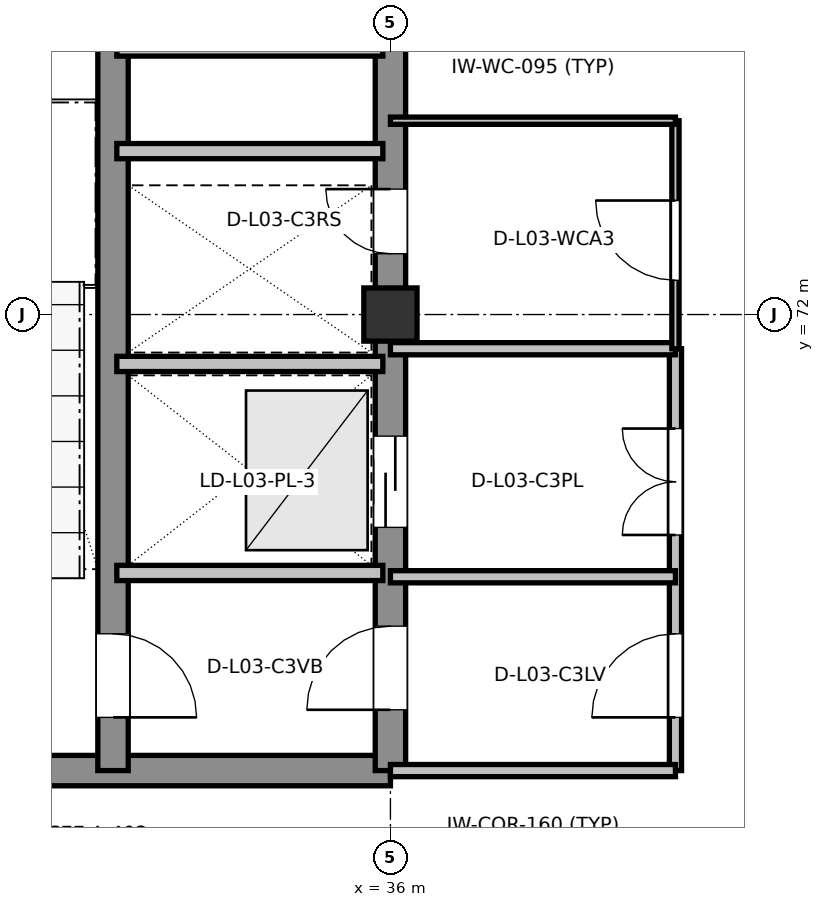
"""IFC4 building model, lengths in metres.
Left out: names, types, materials, properties, quantities, classifications, styles, units other than length and angle.
Written with IfcOpenShell. Run it as: python <this file> out.ifc"""

import sys

from ifc_helpers import new_model, si_unit, direction, frame, frame_2d, origin, origin_2d, place, context, subcontext, project, spatial, rectangle, extrude, element, fill, save


model = new_model("IFC4")
c1 = context("Model", 3, precision=1e-05, world=origin(), true_north=direction((0.0, 1.0)))
c2 = subcontext(c1, "Body", "Model", "MODEL_VIEW")
j1 = project(units=[si_unit("LENGTHUNIT", "METRE"), si_unit("PLANEANGLEUNIT", "RADIAN")], contexts=[c1])
p1 = place(None, origin())
s1 = spatial("IfcSite", under=j1, at=p1, CompositionType="ELEMENT")
p2 = place(p1, origin())
s2 = spatial("IfcBuilding", under=s1, at=p2, CompositionType="ELEMENT")
p3 = place(p2, frame((0.0, 0.0, 15.0)))
s3 = spatial("IfcBuildingStorey", under=s2, at=p3, CompositionType="ELEMENT", Elevation=15.0)
p4 = place(p3, frame((36.0, 72.0, 0.0), z_axis=(0.0, 0.0, 1.0), x_axis=(1.0, 0.0, 0.0)))
e1 = element("IfcColumn", 1, at=p4, inside=s3, PredefinedType="COLUMN", context=c2, shape_type="SweptSolid", body=[
    extrude(rectangle(XDim=0.7, YDim=0.7, at=origin_2d()), origin(), (0.0, 0.0, 1.0), 4.2),
])
p5 = place(p3, frame((27.0, 66.0, 0.0), z_axis=(0.0, 0.0, 1.0), x_axis=(1.0, 0.0, 0.0)))
e2 = element("IfcWall", 2, at=p5, inside=s3, PredefinedType="SHEAR", context=c2, shape_type="SweptSolid", body=[
    extrude(rectangle(XDim=9.0, YDim=0.4, at=frame_2d((4.5, 0.0))), origin(), (0.0, 0.0, 1.0), 3.96),
])
p6 = place(p3, frame((36.0, 66.0, 0.0), z_axis=(0.0, 0.0, 1.0), x_axis=(0.0, 1.0, 0.0)))
e3 = element("IfcWall", 3, at=p6, inside=s3, PredefinedType="SHEAR", context=c2, shape_type="SweptSolid", body=[
    extrude(rectangle(XDim=18.0, YDim=0.4, at=frame_2d((9.0, 0.0))), origin(), (0.0, 0.0, 1.0), 3.96),
])
p7 = place(p6, frame((0.8, 0.0, 0.0)))
e4 = element("IfcOpeningElement", 4, at=p7, cuts=e3, PredefinedType="OPENING", context=c2, shape_type="SweptSolid", body=[
    extrude(rectangle(XDim=1.1, YDim=2.16, at=frame_2d((0.55, 1.08))), frame((0.0, 0.21, 0.0), z_axis=(0.0, -1.0, 0.0), x_axis=(1.0, 0.0, 0.0)), (0.0, 0.0, 1.0), 0.42),
])
p8 = place(p6, frame((3.2, 0.0, 0.0)))
e5 = element("IfcOpeningElement", 5, at=p8, cuts=e3, PredefinedType="OPENING", context=c2, shape_type="SweptSolid", body=[
    extrude(rectangle(XDim=1.2, YDim=2.2, at=frame_2d((0.6, 1.1))), frame((0.0, 0.21, 0.0), z_axis=(0.0, -1.0, 0.0), x_axis=(1.0, 0.0, 0.0)), (0.0, 0.0, 1.0), 0.42),
])
p9 = place(p6, frame((6.8, 0.0, 0.0)))
e6 = element("IfcOpeningElement", 6, at=p9, cuts=e3, PredefinedType="OPENING", context=c2, shape_type="SweptSolid", body=[
    extrude(rectangle(XDim=0.85, YDim=2.1, at=frame_2d((0.425, 1.05))), frame((0.0, 0.21, 0.0), z_axis=(0.0, -1.0, 0.0), x_axis=(1.0, 0.0, 0.0)), (0.0, 0.0, 1.0), 0.42),
])
p10 = place(p3, frame((32.35, 66.0, 0.0), z_axis=(0.0, 0.0, 1.0), x_axis=(0.0, 1.0, 0.0)))
e7 = element("IfcWall", 7, at=p10, inside=s3, PredefinedType="SHEAR", context=c2, shape_type="SweptSolid", body=[
    extrude(rectangle(XDim=18.0, YDim=0.4, at=frame_2d((9.0, 0.0))), origin(), (0.0, 0.0, 1.0), 3.96),
])
p11 = place(p10, frame((0.7, 0.0, 0.0)))
e8 = element("IfcOpeningElement", 8, at=p11, cuts=e7, PredefinedType="OPENING", context=c2, shape_type="SweptSolid", body=[
    extrude(rectangle(XDim=1.1, YDim=2.16, at=frame_2d((0.55, 1.08))), frame((0.0, 0.21, 0.0), z_axis=(0.0, -1.0, 0.0), x_axis=(1.0, 0.0, 0.0)), (0.0, 0.0, 1.0), 0.42),
])
for number, where, z_axis, x_axis in (
    (9, (32.4, 68.6, 0.0), (0.0, 0.0, 1.0), (1.0, 0.0, 0.0)),
    (10, (32.4, 71.35, 0.0), (0.0, 0.0, 1.0), (1.0, 0.0, 0.0)),
    (11, (32.4, 74.15, 0.0), (0.0, 0.0, 1.0), (1.0, 0.0, 0.0)),
    (12, (32.4, 75.5, 0.0), (0.0, 0.0, 1.0), (1.0, 0.0, 0.0)),
):
    element("IfcWall", number, at=place(p3, frame(where, z_axis=z_axis, x_axis=x_axis)), inside=s3, PredefinedType="PARTITIONING", context=c2, shape_type="SweptSolid", body=[
        extrude(rectangle(XDim=3.5, YDim=0.2, at=frame_2d((1.75, 0.0))), origin(), (0.0, 0.0, 1.0), 3.96),
    ])
p12 = place(p3, frame((39.75, 66.0, 0.0), z_axis=(0.0, 0.0, 1.0), x_axis=(0.0, 1.0, 0.0)))
e13 = element("IfcWall", 13, at=p12, inside=s3, PredefinedType="PARTITIONING", context=c2, shape_type="SweptSolid", body=[
    extrude(rectangle(XDim=5.55, YDim=0.16, at=frame_2d((2.775, 0.0))), origin(), (0.0, 0.0, 1.0), 3.96),
])
p13 = place(p12, frame((0.7, 0.0, 0.0)))
e14 = element("IfcOpeningElement", 14, at=p13, cuts=e13, PredefinedType="OPENING", context=c2, shape_type="SweptSolid", body=[
    extrude(rectangle(XDim=1.1, YDim=2.16, at=frame_2d((0.55, 1.08))), frame((0.0, 0.09, 0.0), z_axis=(0.0, -1.0, 0.0), x_axis=(1.0, 0.0, 0.0)), (0.0, 0.0, 1.0), 0.18),
])
p14 = place(p12, frame((3.1, 0.0, 0.0)))
e15 = element("IfcOpeningElement", 15, at=p14, cuts=e13, PredefinedType="OPENING", context=c2, shape_type="SweptSolid", body=[
    extrude(rectangle(XDim=1.4, YDim=2.2, at=frame_2d((0.7, 1.1))), frame((0.0, 0.09, 0.0), z_axis=(0.0, -1.0, 0.0), x_axis=(1.0, 0.0, 0.0)), (0.0, 0.0, 1.0), 0.18),
])
p15 = place(p3, frame((36.0, 66.0, 0.0), z_axis=(0.0, 0.0, 1.0), x_axis=(1.0, 0.0, 0.0)))
e16 = element("IfcWall", 16, at=p15, inside=s3, PredefinedType="PARTITIONING", context=c2, shape_type="SweptSolid", body=[
    extrude(rectangle(XDim=3.75, YDim=0.16, at=frame_2d((1.875, 0.0))), origin(), (0.0, 0.0, 1.0), 3.645),
])
for number, where, z_axis, x_axis in (
    (17, (36.0, 68.55, 0.0), (0.0, 0.0, 1.0), (1.0, 0.0, 0.0)),
    (18, (36.0, 71.55, 0.0), (0.0, 0.0, 1.0), (1.0, 0.0, 0.0)),
):
    element("IfcWall", number, at=place(p3, frame(where, z_axis=z_axis, x_axis=x_axis)), inside=s3, PredefinedType="PARTITIONING", context=c2, shape_type="SweptSolid", body=[
        extrude(rectangle(XDim=3.75, YDim=0.16, at=frame_2d((1.875, 0.0))), origin(), (0.0, 0.0, 1.0), 3.96),
    ])
p16 = place(p3, frame((39.75, 71.55, 0.0), z_axis=(0.0, 0.0, 1.0), x_axis=(0.0, 1.0, 0.0)))
e19 = element("IfcWall", 19, at=p16, inside=s3, PredefinedType="PARTITIONING", context=c2, shape_type="SweptSolid", body=[
    extrude(rectangle(XDim=3.0, YDim=0.095, at=frame_2d((1.5, 0.0))), origin(), (0.0, 0.0, 1.0), 3.96),
])
p17 = place(p16, frame((0.9, 0.0, 0.0)))
e20 = element("IfcOpeningElement", 20, at=p17, cuts=e19, PredefinedType="OPENING", context=c2, shape_type="SweptSolid", body=[
    extrude(rectangle(XDim=1.05, YDim=2.13, at=frame_2d((0.525, 1.065))), frame((0.0, 0.057, 0.0), z_axis=(0.0, -1.0, 0.0), x_axis=(1.0, 0.0, 0.0)), (0.0, 0.0, 1.0), 0.115),
])
p18 = place(p3, frame((36.0, 74.55, 0.0), z_axis=(0.0, 0.0, 1.0), x_axis=(1.0, 0.0, 0.0)))
e21 = element("IfcWall", 21, at=p18, inside=s3, PredefinedType="PARTITIONING", context=c2, shape_type="SweptSolid", body=[
    extrude(rectangle(XDim=3.75, YDim=0.095, at=frame_2d((1.875, 0.0))), origin(), (0.0, 0.0, 1.0), 3.96),
])
p19 = place(p11, frame((1.1, 0.0, 0.0), z_axis=(0.0, 0.0, 1.0), x_axis=(-1.0, 0.0, 0.0)))
e22 = element("IfcDoor", 22, at=p19, inside=s3, OperationType="SINGLE_SWING_RIGHT", PredefinedType="DOOR", context=c2, shape_type="SweptSolid", body=[
    extrude(rectangle(XDim=1.1, YDim=2.16, at=frame_2d((0.55, 1.08))), frame((0.0, 0.025, 0.0), z_axis=(0.0, -1.0, 0.0), x_axis=(1.0, 0.0, 0.0)), (0.0, 0.0, 1.0), 0.05),
])
fill(e8, e22)
p20 = place(p7, origin())
e23 = element("IfcDoor", 23, at=p20, inside=s3, OperationType="SINGLE_SWING_LEFT", PredefinedType="DOOR", context=c2, shape_type="SweptSolid", body=[
    extrude(rectangle(XDim=1.1, YDim=2.16, at=frame_2d((0.55, 1.08))), frame((0.0, 0.025, 0.0), z_axis=(0.0, -1.0, 0.0), x_axis=(1.0, 0.0, 0.0)), (0.0, 0.0, 1.0), 0.05),
])
fill(e4, e23)
p21 = place(p8, origin())
e24 = element("IfcDoor", 24, at=p21, inside=s3, OperationType="SLIDING_TO_LEFT", PredefinedType="DOOR", context=c2, shape_type="SweptSolid", body=[
    extrude(rectangle(XDim=1.2, YDim=2.2, at=frame_2d((0.6, 1.1))), frame((0.0, 0.025, 0.0), z_axis=(0.0, -1.0, 0.0), x_axis=(1.0, 0.0, 0.0)), (0.0, 0.0, 1.0), 0.05),
])
fill(e5, e24)
p22 = place(p9, origin())
e25 = element("IfcDoor", 25, at=p22, inside=s3, OperationType="SINGLE_SWING_RIGHT", PredefinedType="DOOR", context=c2, shape_type="SweptSolid", body=[
    extrude(rectangle(XDim=0.85, YDim=2.1, at=frame_2d((0.425, 1.05))), frame((0.0, 0.025, 0.0), z_axis=(0.0, -1.0, 0.0), x_axis=(1.0, 0.0, 0.0)), (0.0, 0.0, 1.0), 0.05),
])
fill(e6, e25)
p23 = place(p13, origin())
e26 = element("IfcDoor", 26, at=p23, inside=s3, OperationType="SINGLE_SWING_LEFT", PredefinedType="DOOR", context=c2, shape_type="SweptSolid", body=[
    extrude(rectangle(XDim=1.1, YDim=2.16, at=frame_2d((0.55, 1.08))), frame((0.0, 0.025, 0.0), z_axis=(0.0, -1.0, 0.0), x_axis=(1.0, 0.0, 0.0)), (0.0, 0.0, 1.0), 0.05),
])
fill(e14, e26)
p24 = place(p14, origin())
e27 = element("IfcDoor", 27, at=p24, inside=s3, OperationType="DOUBLE_DOOR_SINGLE_SWING", PredefinedType="DOOR", context=c2, shape_type="SweptSolid", body=[
    extrude(rectangle(XDim=1.4, YDim=2.2, at=frame_2d((0.7, 1.1))), frame((0.0, 0.025, 0.0), z_axis=(0.0, -1.0, 0.0), x_axis=(1.0, 0.0, 0.0)), (0.0, 0.0, 1.0), 0.05),
])
fill(e15, e27)
p25 = place(p17, origin())
e28 = element("IfcDoor", 28, at=p25, inside=s3, OperationType="SINGLE_SWING_RIGHT", PredefinedType="DOOR", context=c2, shape_type="SweptSolid", body=[
    extrude(rectangle(XDim=1.05, YDim=2.13, at=frame_2d((0.525, 1.065))), frame((0.0, 0.025, 0.0), z_axis=(0.0, -1.0, 0.0), x_axis=(1.0, 0.0, 0.0)), (0.0, 0.0, 1.0), 0.05),
])
fill(e20, e28)
save(model, sys.argv[1])
